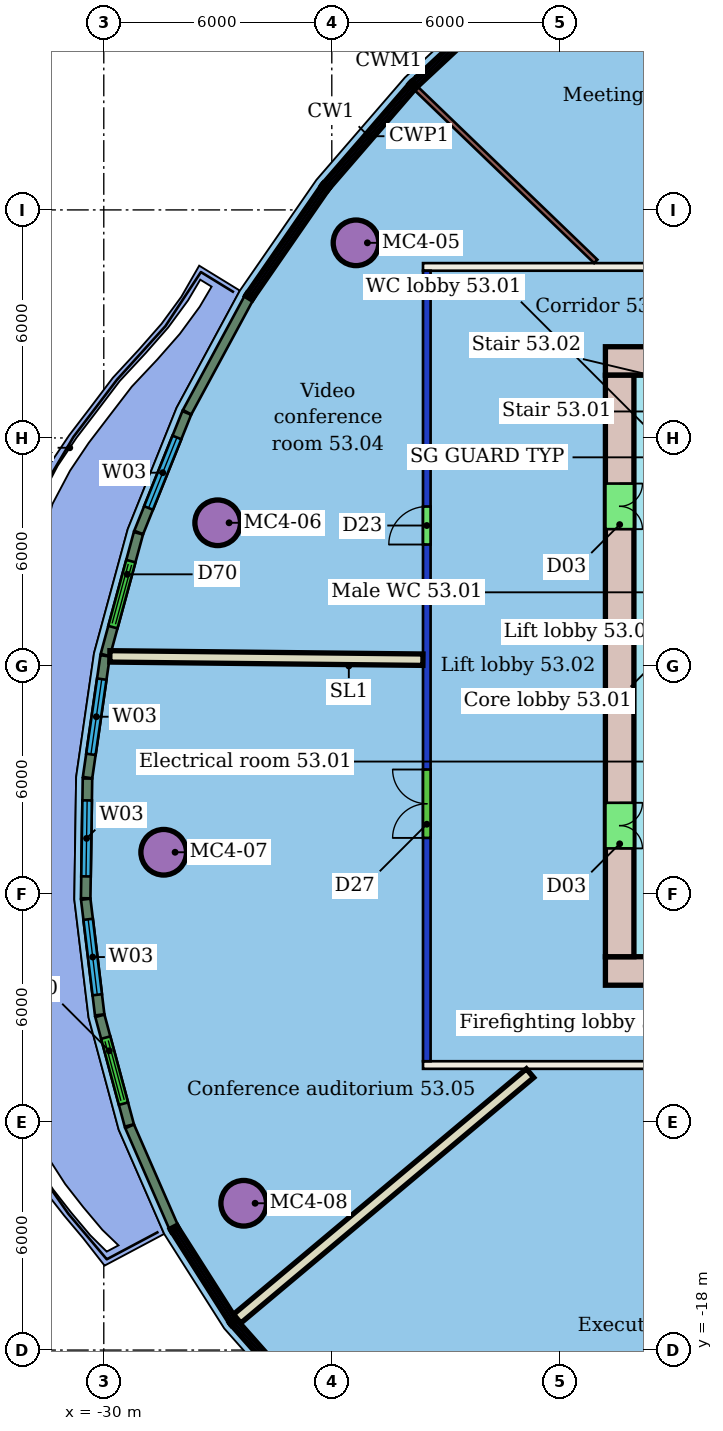
"""IFC4 building model, lengths in metres.
Left out: names, types, materials, properties, quantities, classifications, styles, units other than length and angle.
Written with IfcOpenShell. Run it as: python <this file> out.ifc"""

import sys

from ifc_helpers import new_model, si_unit, direction, frame, frame_2d, origin, origin_2d, place, context, subcontext, project, spatial, rectangle, hollow_circle, extrude, element, fill, save


model = new_model("IFC4")
c1 = context("Model", 3, precision=1e-05, world=origin(), true_north=direction((0.0, 1.0)))
c2 = subcontext(c1, "Body", "Model", "MODEL_VIEW")
j1 = project(units=[si_unit("LENGTHUNIT", "METRE"), si_unit("PLANEANGLEUNIT", "RADIAN")], contexts=[c1])
p1 = place(None, origin())
s1 = spatial("IfcSite", under=j1, at=p1, CompositionType="ELEMENT")
p2 = place(p1, origin())
s2 = spatial("IfcBuilding", under=s1, at=p2, CompositionType="ELEMENT")
p3 = place(p2, frame((0.0, 0.0, 217.3)))
s3 = spatial("IfcBuildingStorey", under=s2, at=p3, CompositionType="ELEMENT", Elevation=217.3)
for number, where, z_axis, x_axis in (
    (1, (-23.363, 11.134, 0.0), (0.0, 0.0, 1.0), (1.0, 0.0, 0.0)),
    (2, (-27.003, 3.768, 0.0), (0.0, 0.0, 1.0), (1.0, 0.0, 0.0)),
    (3, (-28.424, -4.901, 0.0), (0.0, 0.0, 1.0), (1.0, 0.0, 0.0)),
    (4, (-26.318, -14.137, 0.0), (0.0, 0.0, 1.0), (1.0, 0.0, 0.0)),
):
    element("IfcColumn", number, at=place(p3, frame(where, z_axis=z_axis, x_axis=x_axis)), inside=s3, PredefinedType="COLUMN", context=c2, shape_type="SweptSolid", body=[
        extrude(hollow_circle(Radius=0.6, WallThickness=0.045, at=origin_2d()), origin(), (0.0, 0.0, 1.0), 3.45),
    ])
p4 = place(p3, frame((9.6, -10.5, 0.0), z_axis=(0.0, 0.0, 1.0), x_axis=(-1.0, 0.0, 0.0)))
e5 = element("IfcWall", 5, at=p4, inside=s3, PredefinedType="PARTITIONING", context=c2, shape_type="SweptSolid", body=[
    extrude(rectangle(XDim=31.2, YDim=0.2, at=frame_2d((15.6, 0.0))), origin(), (0.0, 0.0, 1.0), 3.45),
])
p5 = place(p4, frame((18.695, 0.0, 0.0)))
e6 = element("IfcOpeningElement", 6, at=p5, cuts=e5, PredefinedType="OPENING", context=c2, shape_type="SweptSolid", body=[
    extrude(rectangle(XDim=1.8, YDim=2.1, at=frame_2d((0.9, 1.05))), frame((0.0, 0.11, 0.0), z_axis=(0.0, -1.0, 0.0), x_axis=(1.0, 0.0, 0.0)), (0.0, 0.0, 1.0), 0.22),
])
p6 = place(p4, frame((12.68, 0.0, 0.0)))
e7 = element("IfcOpeningElement", 7, at=p6, cuts=e5, PredefinedType="OPENING", context=c2, shape_type="SweptSolid", body=[
    extrude(rectangle(XDim=1.2, YDim=2.4, at=frame_2d((0.6, 1.2))), frame((0.0, 0.11, 0.0), z_axis=(0.0, -1.0, 0.0), x_axis=(1.0, 0.0, 0.0)), (0.0, 0.0, 1.0), 0.22),
])
p7 = place(p4, frame((7.484, 0.0, 0.0)))
e8 = element("IfcOpeningElement", 8, at=p7, cuts=e5, PredefinedType="OPENING", context=c2, shape_type="SweptSolid", body=[
    extrude(rectangle(XDim=1.0, YDim=2.4, at=frame_2d((0.5, 1.2))), frame((0.0, 0.11, 0.0), z_axis=(0.0, -1.0, 0.0), x_axis=(1.0, 0.0, 0.0)), (0.0, 0.0, 1.0), 0.22),
])
p8 = place(p3, frame((-21.5, -10.4, 0.0), z_axis=(0.0, 0.0, 1.0), x_axis=(0.0, 1.0, 0.0)))
e9 = element("IfcWall", 9, at=p8, inside=s3, PredefinedType="PARTITIONING", context=c2, shape_type="SweptSolid", body=[
    extrude(rectangle(XDim=20.8, YDim=0.2, at=frame_2d((10.4, 0.0))), origin(), (0.0, 0.0, 1.0), 3.05),
])
p9 = place(p8, frame((13.596, 0.0, 0.0)))
e10 = element("IfcOpeningElement", 10, at=p9, cuts=e9, PredefinedType="OPENING", context=c2, shape_type="SweptSolid", body=[
    extrude(rectangle(XDim=1.0, YDim=2.4, at=frame_2d((0.5, 1.2))), frame((0.0, 0.11, 0.0), z_axis=(0.0, -1.0, 0.0), x_axis=(1.0, 0.0, 0.0)), (0.0, 0.0, 1.0), 0.22),
])
p10 = place(p8, frame((5.876, 0.0, 0.0)))
e11 = element("IfcOpeningElement", 11, at=p10, cuts=e9, PredefinedType="OPENING", context=c2, shape_type="SweptSolid", body=[
    extrude(rectangle(XDim=1.8, YDim=2.4, at=frame_2d((0.9, 1.2))), frame((0.0, 0.11, 0.0), z_axis=(0.0, -1.0, 0.0), x_axis=(1.0, 0.0, 0.0)), (0.0, 0.0, 1.0), 0.22),
])
p11 = place(p3, frame((-21.6, 10.5, 0.0), z_axis=(0.0, 0.0, 1.0), x_axis=(1.0, 0.0, 0.0)))
e12 = element("IfcWall", 12, at=p11, inside=s3, PredefinedType="PARTITIONING", context=c2, shape_type="SweptSolid", body=[
    extrude(rectangle(XDim=31.2, YDim=0.2, at=frame_2d((15.6, 0.0))), origin(), (0.0, 0.0, 1.0), 3.45),
])
p12 = place(p11, frame((20.759, 0.0, 0.0)))
e13 = element("IfcOpeningElement", 13, at=p12, cuts=e12, PredefinedType="OPENING", context=c2, shape_type="SweptSolid", body=[
    extrude(rectangle(XDim=1.0, YDim=2.4, at=frame_2d((0.5, 1.2))), frame((0.0, 0.11, 0.0), z_axis=(0.0, -1.0, 0.0), x_axis=(1.0, 0.0, 0.0)), (0.0, 0.0, 1.0), 0.22),
])
p13 = place(p11, frame((13.195, 0.0, 0.0)))
e14 = element("IfcOpeningElement", 14, at=p13, cuts=e12, PredefinedType="OPENING", context=c2, shape_type="SweptSolid", body=[
    extrude(rectangle(XDim=0.9, YDim=2.1, at=frame_2d((0.45, 1.05))), frame((0.0, 0.11, 0.0), z_axis=(0.0, -1.0, 0.0), x_axis=(1.0, 0.0, 0.0)), (0.0, 0.0, 1.0), 0.22),
])
p14 = place(p11, frame((8.927, 0.0, 0.0)))
e15 = element("IfcOpeningElement", 15, at=p14, cuts=e12, PredefinedType="OPENING", context=c2, shape_type="SweptSolid", body=[
    extrude(rectangle(XDim=0.9, YDim=2.1, at=frame_2d((0.45, 1.05))), frame((0.0, 0.11, 0.0), z_axis=(0.0, -1.0, 0.0), x_axis=(1.0, 0.0, 0.0)), (0.0, 0.0, 1.0), 0.22),
])
p15 = place(p11, frame((25.843, 0.0, 0.0)))
e16 = element("IfcOpeningElement", 16, at=p15, cuts=e12, PredefinedType="OPENING", context=c2, shape_type="SweptSolid", body=[
    extrude(rectangle(XDim=1.2, YDim=2.4, at=frame_2d((0.6, 1.2))), frame((0.0, 0.11, 0.0), z_axis=(0.0, -1.0, 0.0), x_axis=(1.0, 0.0, 0.0)), (0.0, 0.0, 1.0), 0.22),
])
p16 = place(p3, frame((-21.771, 15.187, 0.0), z_axis=(0.0, 0.0, 1.0), x_axis=(0.72030986436, -0.69365243408, 0.0)))
e17 = element("IfcWall", 17, at=p16, inside=s3, PredefinedType="PARTITIONING", context=c2, shape_type="SweptSolid", body=[
    extrude(rectangle(XDim=6.548, YDim=0.125, at=frame_2d((3.274, 0.0))), origin(), (0.0, 0.0, 1.0), 3.45),
])
p17 = place(p3, frame((-29.84, 0.253, 0.0), z_axis=(0.0, 0.0, 1.0), x_axis=(0.999943732866, -0.010608067811, 0.0)))
e18 = element("IfcWall", 18, at=p17, inside=s3, PredefinedType="PARTITIONING", context=c2, shape_type="SweptSolid", body=[
    extrude(rectangle(XDim=8.239, YDim=0.3, at=frame_2d((4.12, 0.0))), origin(), (0.0, 0.0, 1.0), 3.45),
])
p18 = place(p3, frame((-26.491, -17.175, 0.0), z_axis=(0.0, 0.0, 1.0), x_axis=(0.766383519692, 0.642383297374, 0.0)))
e19 = element("IfcWall", 19, at=p18, inside=s3, PredefinedType="PARTITIONING", context=c2, shape_type="SweptSolid", body=[
    extrude(rectangle(XDim=10.057, YDim=0.3, at=frame_2d((5.028, 0.0))), origin(), (0.0, 0.0, 1.0), 3.45),
])
p19 = place(p3, frame((-26.19, 9.671, 0.0), z_axis=(0.0, 0.0, 1.0), x_axis=(-0.47528890286, -0.879829789685, 0.0)))
e20 = element("IfcWall", 20, at=p19, inside=s3, PredefinedType="SOLIDWALL", context=c2, shape_type="SweptSolid", body=[
    extrude(rectangle(XDim=3.403, YDim=0.25, at=frame_2d((1.701, 0.0))), origin(), (0.0, 0.0, 1.0), 3.1),
])
p20 = place(p3, frame((-27.816, 6.658, 0.0), z_axis=(0.0, 0.0, 1.0), x_axis=(-0.37322779977, -0.92773973154, 0.0)))
e21 = element("IfcWall", 21, at=p20, inside=s3, PredefinedType="SOLIDWALL", context=c2, shape_type="SweptSolid", body=[
    extrude(rectangle(XDim=3.39, YDim=0.25, at=frame_2d((1.695, 0.0))), origin(), (0.0, 0.0, 1.0), 3.1),
])
p21 = place(p20, frame((0.695, 0.0, 0.9)))
e22 = element("IfcOpeningElement", 22, at=p21, cuts=e21, PredefinedType="OPENING", context=c2, shape_type="SweptSolid", body=[
    extrude(rectangle(XDim=2.0, YDim=2.1, at=frame_2d((1.0, 1.05))), frame((0.0, 0.135, 0.0), z_axis=(0.0, -1.0, 0.0), x_axis=(1.0, 0.0, 0.0)), (0.0, 0.0, 1.0), 0.27),
])
p22 = place(p3, frame((-29.089, 3.491, 0.0), z_axis=(0.0, 0.0, 1.0), x_axis=(-0.262494842553, -0.964933395439, 0.0)))
e23 = element("IfcWall", 23, at=p22, inside=s3, PredefinedType="SOLIDWALL", context=c2, shape_type="SweptSolid", body=[
    extrude(rectangle(XDim=3.319, YDim=0.25, at=frame_2d((1.659, 0.0))), origin(), (0.0, 0.0, 1.0), 3.1),
])
p23 = place(p22, frame((0.759, 0.0, 0.0)))
e24 = element("IfcOpeningElement", 24, at=p23, cuts=e23, PredefinedType="OPENING", context=c2, shape_type="SweptSolid", body=[
    extrude(rectangle(XDim=1.8, YDim=2.4, at=frame_2d((0.9, 1.2))), frame((0.0, 0.135, 0.0), z_axis=(0.0, -1.0, 0.0), x_axis=(1.0, 0.0, 0.0)), (0.0, 0.0, 1.0), 0.27),
])
p24 = place(p3, frame((-29.964, 0.267, 0.0), z_axis=(0.0, 0.0, 1.0), x_axis=(-0.14297307374, -0.989726578498, 0.0)))
e25 = element("IfcWall", 25, at=p24, inside=s3, PredefinedType="SOLIDWALL", context=c2, shape_type="SweptSolid", body=[
    extrude(rectangle(XDim=3.238, YDim=0.25, at=frame_2d((1.619, 0.0))), origin(), (0.0, 0.0, 1.0), 3.1),
])
p25 = place(p24, frame((0.619, 0.0, 0.9)))
e26 = element("IfcOpeningElement", 26, at=p25, cuts=e25, PredefinedType="OPENING", context=c2, shape_type="SweptSolid", body=[
    extrude(rectangle(XDim=2.0, YDim=2.1, at=frame_2d((1.0, 1.05))), frame((0.0, 0.135, 0.0), z_axis=(0.0, -1.0, 0.0), x_axis=(1.0, 0.0, 0.0)), (0.0, 0.0, 1.0), 0.27),
])
p26 = place(p3, frame((-30.429, -2.962, 0.0), z_axis=(0.0, 0.0, 1.0), x_axis=(-0.01503123462, -0.999887024611, 0.0)))
e27 = element("IfcWall", 27, at=p26, inside=s3, PredefinedType="SOLIDWALL", context=c2, shape_type="SweptSolid", body=[
    extrude(rectangle(XDim=3.151, YDim=0.25, at=frame_2d((1.575, 0.0))), origin(), (0.0, 0.0, 1.0), 3.1),
])
p27 = place(p26, frame((0.575, 0.0, 0.9)))
e28 = element("IfcOpeningElement", 28, at=p27, cuts=e27, PredefinedType="OPENING", context=c2, shape_type="SweptSolid", body=[
    extrude(rectangle(XDim=2.0, YDim=2.1, at=frame_2d((1.0, 1.05))), frame((0.0, 0.135, 0.0), z_axis=(0.0, -1.0, 0.0), x_axis=(1.0, 0.0, 0.0)), (0.0, 0.0, 1.0), 0.27),
])
p28 = place(p3, frame((-30.475, -6.137, 0.0), z_axis=(0.0, 0.0, 1.0), x_axis=(0.119946033094, -0.992780413357, 0.0)))
e29 = element("IfcWall", 29, at=p28, inside=s3, PredefinedType="SOLIDWALL", context=c2, shape_type="SweptSolid", body=[
    extrude(rectangle(XDim=3.065, YDim=0.25, at=frame_2d((1.533, 0.0))), origin(), (0.0, 0.0, 1.0), 3.1),
])
p29 = place(p28, frame((0.533, 0.0, 0.9)))
e30 = element("IfcOpeningElement", 30, at=p29, cuts=e29, PredefinedType="OPENING", context=c2, shape_type="SweptSolid", body=[
    extrude(rectangle(XDim=2.0, YDim=2.1, at=frame_2d((1.0, 1.05))), frame((0.0, 0.135, 0.0), z_axis=(0.0, -1.0, 0.0), x_axis=(1.0, 0.0, 0.0)), (0.0, 0.0, 1.0), 0.27),
])
p30 = place(p3, frame((-30.103, -9.206, 0.0), z_axis=(0.0, 0.0, 1.0), x_axis=(0.25942805707, -0.965762436215, 0.0)))
e31 = element("IfcWall", 31, at=p30, inside=s3, PredefinedType="SOLIDWALL", context=c2, shape_type="SweptSolid", body=[
    extrude(rectangle(XDim=2.986, YDim=0.25, at=frame_2d((1.493, 0.0))), origin(), (0.0, 0.0, 1.0), 3.1),
])
p31 = place(p30, frame((0.593, 0.0, 0.0)))
e32 = element("IfcOpeningElement", 32, at=p31, cuts=e31, PredefinedType="OPENING", context=c2, shape_type="SweptSolid", body=[
    extrude(rectangle(XDim=1.8, YDim=2.4, at=frame_2d((0.9, 1.2))), frame((0.0, 0.135, 0.0), z_axis=(0.0, -1.0, 0.0), x_axis=(1.0, 0.0, 0.0)), (0.0, 0.0, 1.0), 0.27),
])
p32 = place(p3, frame((-29.319, -12.115, 0.0), z_axis=(0.0, 0.0, 1.0), x_axis=(0.40003123877, -0.91650150464, 0.0)))
e33 = element("IfcWall", 33, at=p32, inside=s3, PredefinedType="SOLIDWALL", context=c2, shape_type="SweptSolid", body=[
    extrude(rectangle(XDim=2.879, YDim=0.25, at=frame_2d((1.439, 0.0))), origin(), (0.0, 0.0, 1.0), 3.1),
])
p33 = place(p3, frame((-6.0, 8.025, 0.0), z_axis=(0.0, 0.0, 1.0), x_axis=(-1.0, 0.0, 0.0)))
e34 = element("IfcWall", 34, at=p33, inside=s3, PredefinedType="SHEAR", context=c2, shape_type="SweptSolid", body=[
    extrude(rectangle(XDim=10.8, YDim=0.75, at=frame_2d((5.4, 0.0))), origin(), (0.0, 0.0, 1.0), 3.3),
])
p34 = place(p33, frame((5.2, 0.0, 0.0)))
e35 = element("IfcOpeningElement", 35, at=p34, cuts=e34, PredefinedType="OPENING", context=c2, shape_type="SweptSolid", body=[
    extrude(rectangle(XDim=1.2, YDim=2.1, at=frame_2d((0.6, 1.05))), frame((0.0, 0.385, 0.0), z_axis=(0.0, -1.0, 0.0), x_axis=(1.0, 0.0, 0.0)), (0.0, 0.0, 1.0), 0.77),
])
p35 = place(p3, frame((-16.8, -8.025, 0.0), z_axis=(0.0, 0.0, 1.0), x_axis=(1.0, 0.0, 0.0)))
e36 = element("IfcWall", 36, at=p35, inside=s3, PredefinedType="SHEAR", context=c2, shape_type="SweptSolid", body=[
    extrude(rectangle(XDim=21.6, YDim=0.75, at=frame_2d((10.8, 0.0))), origin(), (0.0, 0.0, 1.0), 3.3),
])
p36 = place(p35, frame((4.8, 0.0, 0.0)))
e37 = element("IfcOpeningElement", 37, at=p36, cuts=e36, PredefinedType="OPENING", context=c2, shape_type="SweptSolid", body=[
    extrude(rectangle(XDim=1.2, YDim=2.1, at=frame_2d((0.6, 1.05))), frame((0.0, 0.385, 0.0), z_axis=(0.0, -1.0, 0.0), x_axis=(1.0, 0.0, 0.0)), (0.0, 0.0, 1.0), 0.77),
])
p37 = place(p3, frame((-16.425, 7.65, 0.0), z_axis=(0.0, 0.0, 1.0), x_axis=(0.0, -1.0, 0.0)))
e38 = element("IfcWall", 38, at=p37, inside=s3, PredefinedType="SHEAR", context=c2, shape_type="SweptSolid", body=[
    extrude(rectangle(XDim=15.3, YDim=0.75, at=frame_2d((7.65, 0.0))), origin(), (0.0, 0.0, 1.0), 3.3),
])
p38 = place(p37, frame((11.25, 0.0, 0.0)))
e39 = element("IfcOpeningElement", 39, at=p38, cuts=e38, PredefinedType="OPENING", context=c2, shape_type="SweptSolid", body=[
    extrude(rectangle(XDim=1.2, YDim=2.1, at=frame_2d((0.6, 1.05))), frame((0.0, 0.385, 0.0), z_axis=(0.0, -1.0, 0.0), x_axis=(1.0, 0.0, 0.0)), (0.0, 0.0, 1.0), 0.77),
])
p39 = place(p37, frame((2.85, 0.0, 0.0)))
e40 = element("IfcOpeningElement", 40, at=p39, cuts=e38, PredefinedType="OPENING", context=c2, shape_type="SweptSolid", body=[
    extrude(rectangle(XDim=1.2, YDim=2.1, at=frame_2d((0.6, 1.05))), frame((0.0, 0.385, 0.0), z_axis=(0.0, -1.0, 0.0), x_axis=(1.0, 0.0, 0.0)), (0.0, 0.0, 1.0), 0.77),
])
p40 = place(p9, origin())
e41 = element("IfcDoor", 41, at=p40, inside=s3, OperationType="SINGLE_SWING_LEFT", PredefinedType="DOOR", context=c2, shape_type="SweptSolid", body=[
    extrude(rectangle(XDim=1.0, YDim=2.4, at=frame_2d((0.5, 1.2))), frame((0.0, 0.025, 0.0), z_axis=(0.0, -1.0, 0.0), x_axis=(1.0, 0.0, 0.0)), (0.0, 0.0, 1.0), 0.05),
])
fill(e10, e41)
p41 = place(p10, origin())
e42 = element("IfcDoor", 42, at=p41, inside=s3, OperationType="DOUBLE_DOOR_SINGLE_SWING", PredefinedType="DOOR", context=c2, shape_type="SweptSolid", body=[
    extrude(rectangle(XDim=1.8, YDim=2.4, at=frame_2d((0.9, 1.2))), frame((0.0, 0.025, 0.0), z_axis=(0.0, -1.0, 0.0), x_axis=(1.0, 0.0, 0.0)), (0.0, 0.0, 1.0), 0.05),
])
fill(e11, e42)
p42 = place(p21, origin())
e43 = element("IfcWindow", 43, at=p42, inside=s3, PartitioningType="SINGLE_PANEL", PredefinedType="WINDOW", context=c2, shape_type="SweptSolid", body=[
    extrude(rectangle(XDim=2.0, YDim=2.1, at=frame_2d((1.0, 1.05))), frame((0.0, 0.03, 0.0), z_axis=(0.0, -1.0, 0.0), x_axis=(1.0, 0.0, 0.0)), (0.0, 0.0, 1.0), 0.06),
])
fill(e22, e43)
p43 = place(p23, origin())
e44 = element("IfcDoor", 44, at=p43, inside=s3, OperationType="DOUBLE_DOOR_SLIDING", PredefinedType="DOOR", context=c2, shape_type="SweptSolid", body=[
    extrude(rectangle(XDim=1.8, YDim=2.4, at=frame_2d((0.9, 1.2))), frame((0.0, 0.025, 0.0), z_axis=(0.0, -1.0, 0.0), x_axis=(1.0, 0.0, 0.0)), (0.0, 0.0, 1.0), 0.05),
])
fill(e24, e44)
p44 = place(p25, origin())
e45 = element("IfcWindow", 45, at=p44, inside=s3, PartitioningType="SINGLE_PANEL", PredefinedType="WINDOW", context=c2, shape_type="SweptSolid", body=[
    extrude(rectangle(XDim=2.0, YDim=2.1, at=frame_2d((1.0, 1.05))), frame((0.0, 0.03, 0.0), z_axis=(0.0, -1.0, 0.0), x_axis=(1.0, 0.0, 0.0)), (0.0, 0.0, 1.0), 0.06),
])
fill(e26, e45)
p45 = place(p27, origin())
e46 = element("IfcWindow", 46, at=p45, inside=s3, PartitioningType="SINGLE_PANEL", PredefinedType="WINDOW", context=c2, shape_type="SweptSolid", body=[
    extrude(rectangle(XDim=2.0, YDim=2.1, at=frame_2d((1.0, 1.05))), frame((0.0, 0.03, 0.0), z_axis=(0.0, -1.0, 0.0), x_axis=(1.0, 0.0, 0.0)), (0.0, 0.0, 1.0), 0.06),
])
fill(e28, e46)
p46 = place(p29, origin())
e47 = element("IfcWindow", 47, at=p46, inside=s3, PartitioningType="SINGLE_PANEL", PredefinedType="WINDOW", context=c2, shape_type="SweptSolid", body=[
    extrude(rectangle(XDim=2.0, YDim=2.1, at=frame_2d((1.0, 1.05))), frame((0.0, 0.03, 0.0), z_axis=(0.0, -1.0, 0.0), x_axis=(1.0, 0.0, 0.0)), (0.0, 0.0, 1.0), 0.06),
])
fill(e30, e47)
p47 = place(p31, origin())
e48 = element("IfcDoor", 48, at=p47, inside=s3, OperationType="DOUBLE_DOOR_SLIDING", PredefinedType="DOOR", context=c2, shape_type="SweptSolid", body=[
    extrude(rectangle(XDim=1.8, YDim=2.4, at=frame_2d((0.9, 1.2))), frame((0.0, 0.025, 0.0), z_axis=(0.0, -1.0, 0.0), x_axis=(1.0, 0.0, 0.0)), (0.0, 0.0, 1.0), 0.05),
])
fill(e32, e48)
p48 = place(p38, origin())
e49 = element("IfcDoor", 49, at=p48, inside=s3, OperationType="DOUBLE_DOOR_SINGLE_SWING", PredefinedType="NOTDEFINED", context=c2, shape_type="SweptSolid", body=[
    extrude(rectangle(XDim=1.2, YDim=2.1, at=frame_2d((0.6, 1.05))), frame((0.0, 0.025, 0.0), z_axis=(0.0, -1.0, 0.0), x_axis=(1.0, 0.0, 0.0)), (0.0, 0.0, 1.0), 0.05),
])
fill(e39, e49)
p49 = place(p39, origin())
e50 = element("IfcDoor", 50, at=p49, inside=s3, OperationType="DOUBLE_DOOR_SINGLE_SWING", PredefinedType="NOTDEFINED", context=c2, shape_type="SweptSolid", body=[
    extrude(rectangle(XDim=1.2, YDim=2.1, at=frame_2d((0.6, 1.05))), frame((0.0, 0.025, 0.0), z_axis=(0.0, -1.0, 0.0), x_axis=(1.0, 0.0, 0.0)), (0.0, 0.0, 1.0), 0.05),
])
fill(e40, e50)
save(model, sys.argv[1])
